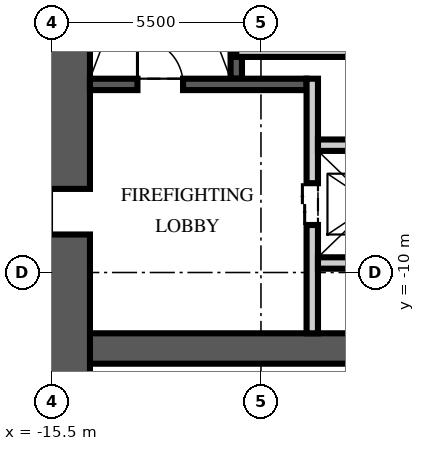
"""IFC4 building model, lengths in metres.
Left out: names, types, materials, properties, quantities, classifications, styles, units other than length and angle.
Written with IfcOpenShell. Run it as: python <this file> out.ifc"""

import sys

from ifc_helpers import new_model, si_unit, direction, frame, frame_2d, origin, place, context, subcontext, project, spatial, rectangle, extrude, element, fill, save


model = new_model("IFC4")
c1 = context("Model", 3, precision=1e-05, world=origin(), true_north=direction((0.0, 1.0)))
c2 = subcontext(c1, "Body", "Model", "MODEL_VIEW")
j1 = project(units=[si_unit("LENGTHUNIT", "METRE"), si_unit("PLANEANGLEUNIT", "RADIAN")], contexts=[c1])
p1 = place(None, origin())
s1 = spatial("IfcSite", under=j1, at=p1, CompositionType="ELEMENT")
p2 = place(p1, origin())
s2 = spatial("IfcBuilding", under=s1, at=p2, CompositionType="ELEMENT")
p3 = place(p2, frame((0.0, 0.0, 77.25)))
s3 = spatial("IfcBuildingStorey", under=s2, at=p3, CompositionType="ELEMENT", Elevation=77.25)
p4 = place(p3, frame((-15.5, -12.0, -0.25), z_axis=(0.0, 0.0, 1.0), x_axis=(1.0, 0.0, 0.0)))
e1 = element("IfcWall", 1, at=p4, inside=s3, PredefinedType="SHEAR", context=c2, shape_type="SweptSolid", body=[
    extrude(rectangle(XDim=31.0, YDim=0.8, at=frame_2d((15.5, 0.0))), origin(), (0.0, 0.0, 1.0), 3.75),
])
p5 = place(p3, frame((-15.5, -15.5, -0.25), z_axis=(0.0, 0.0, 1.0), x_axis=(0.0, 1.0, 0.0)))
e2 = element("IfcWall", 2, at=p5, inside=s3, PredefinedType="SHEAR", context=c2, shape_type="SweptSolid", body=[
    extrude(rectangle(XDim=31.0, YDim=2.0, at=frame_2d((15.5, 0.0))), origin(), (0.0, 0.0, 1.0), 3.75),
])
p6 = place(p5, frame((6.5, 0.0, 0.25)))
e3 = element("IfcOpeningElement", 3, at=p6, cuts=e2, PredefinedType="OPENING", context=c2, shape_type="SweptSolid", body=[
    extrude(rectangle(XDim=1.2, YDim=2.1, at=frame_2d((0.6, 1.05))), frame((0.0, 1.01, 0.0), z_axis=(0.0, -1.0, 0.0), x_axis=(1.0, 0.0, 0.0)), (0.0, 0.0, 1.0), 2.02),
])
p7 = place(p5, frame((23.0, 0.0, 0.25)))
e4 = element("IfcOpeningElement", 4, at=p7, cuts=e2, PredefinedType="OPENING", context=c2, shape_type="SweptSolid", body=[
    extrude(rectangle(XDim=1.8, YDim=2.1, at=frame_2d((0.9, 1.05))), frame((0.0, 1.01, 0.0), z_axis=(0.0, -1.0, 0.0), x_axis=(1.0, 0.0, 0.0)), (0.0, 0.0, 1.0), 2.02),
])
p8 = place(p3, frame((-10.65, -4.9, 0.0), z_axis=(0.0, 0.0, 1.0), x_axis=(0.0, 1.0, 0.0)))
e5 = element("IfcWall", 5, at=p8, inside=s3, PredefinedType="SOLIDWALL", context=c2, shape_type="SweptSolid", body=[
    extrude(rectangle(XDim=10.1, YDim=0.3, at=frame_2d((5.05, 0.0))), origin(), (0.0, 0.0, 1.0), 3.5),
])
p9 = place(p3, frame((-14.5, -5.05, 0.0), z_axis=(0.0, 0.0, 1.0), x_axis=(1.0, 0.0, 0.0)))
e6 = element("IfcWall", 6, at=p9, inside=s3, PredefinedType="SOLIDWALL", context=c2, shape_type="SweptSolid", body=[
    extrude(rectangle(XDim=5.7, YDim=0.3, at=frame_2d((2.85, 0.0))), origin(), (0.0, 0.0, 1.0), 3.5),
])
p10 = place(p9, frame((1.25, 0.0, 0.0)))
e7 = element("IfcOpeningElement", 7, at=p10, cuts=e6, PredefinedType="OPENING", context=c2, shape_type="SweptSolid", body=[
    extrude(rectangle(XDim=1.2, YDim=2.1, at=frame_2d((0.6, 1.05))), frame((0.0, 0.16, 0.0), z_axis=(0.0, -1.0, 0.0), x_axis=(1.0, 0.0, 0.0)), (0.0, 0.0, 1.0), 0.32),
])
p11 = place(p3, frame((-8.65, -11.6, 0.0), z_axis=(0.0, 0.0, 1.0), x_axis=(0.0, 1.0, 0.0)))
e8 = element("IfcWall", 8, at=p11, inside=s3, PredefinedType="PARTITIONING", context=c2, shape_type="SweptSolid", body=[
    extrude(rectangle(XDim=6.7, YDim=0.3, at=frame_2d((3.35, 0.0))), origin(), (0.0, 0.0, 1.0), 3.5),
])
p12 = place(p11, frame((2.85, 0.0, 0.0)))
e9 = element("IfcOpeningElement", 9, at=p12, cuts=e8, PredefinedType="OPENING", context=c2, shape_type="SweptSolid", body=[
    extrude(rectangle(XDim=1.1, YDim=2.1, at=frame_2d((0.55, 1.05))), frame((0.0, 0.16, 0.0), z_axis=(0.0, -1.0, 0.0), x_axis=(1.0, 0.0, 0.0)), (0.0, 0.0, 1.0), 0.32),
])
p13 = place(p3, frame((-8.5, -6.65, 0.0), z_axis=(0.0, 0.0, 1.0), x_axis=(1.0, 0.0, 0.0)))
e10 = element("IfcWall", 10, at=p13, inside=s3, PredefinedType="PARTITIONING", context=c2, shape_type="SweptSolid", body=[
    extrude(rectangle(XDim=17.0, YDim=0.3, at=frame_2d((8.5, 0.0))), origin(), (0.0, 0.0, 1.0), 3.5),
])
p14 = place(p13, frame((7.8, 0.0, 0.0)))
e11 = element("IfcOpeningElement", 11, at=p14, cuts=e10, PredefinedType="OPENING", context=c2, shape_type="SweptSolid", body=[
    extrude(rectangle(XDim=1.3, YDim=2.4, at=frame_2d((0.65, 1.2))), frame((0.0, 0.16, 0.0), z_axis=(0.0, -1.0, 0.0), x_axis=(1.0, 0.0, 0.0)), (0.0, 0.0, 1.0), 0.32),
])
p15 = place(p13, frame((5.65, 0.0, 0.0)))
e12 = element("IfcOpeningElement", 12, at=p15, cuts=e10, PredefinedType="OPENING", context=c2, shape_type="SweptSolid", body=[
    extrude(rectangle(XDim=0.9, YDim=2.1, at=frame_2d((0.45, 1.05))), frame((0.0, 0.16, 0.0), z_axis=(0.0, -1.0, 0.0), x_axis=(1.0, 0.0, 0.0)), (0.0, 0.0, 1.0), 0.32),
])
p16 = place(p13, frame((10.4, 0.0, 0.0)))
e13 = element("IfcOpeningElement", 13, at=p16, cuts=e10, PredefinedType="OPENING", context=c2, shape_type="SweptSolid", body=[
    extrude(rectangle(XDim=0.9, YDim=2.1, at=frame_2d((0.45, 1.05))), frame((0.0, 0.16, 0.0), z_axis=(0.0, -1.0, 0.0), x_axis=(1.0, 0.0, 0.0)), (0.0, 0.0, 1.0), 0.32),
])
p17 = place(p3, frame((-8.5, -9.75, 0.0), z_axis=(0.0, 0.0, 1.0), x_axis=(1.0, 0.0, 0.0)))
e14 = element("IfcWall", 14, at=p17, inside=s3, PredefinedType="PARTITIONING", context=c2, shape_type="SweptSolid", body=[
    extrude(rectangle(XDim=2.9, YDim=0.3, at=frame_2d((1.45, 0.0))), origin(), (0.0, 0.0, 1.0), 3.5),
])
p18 = place(p3, frame((-10.65, -4.177, 0.0), z_axis=(0.0, 0.0, 1.0), x_axis=(1.0, 0.0, 0.0)))
e15 = element("IfcWall", 15, at=p18, inside=s3, PredefinedType="PARTITIONING", context=c2, shape_type="SweptSolid", body=[
    extrude(rectangle(XDim=6.45, YDim=0.3, at=frame_2d((3.225, 0.0))), origin(), (0.0, 0.0, 1.0), 3.5),
])
p19 = place(p10, origin())
e16 = element("IfcDoor", 16, at=p19, inside=s3, OperationType="SINGLE_SWING_LEFT", PredefinedType="DOOR", context=c2, shape_type="SweptSolid", body=[
    extrude(rectangle(XDim=1.2, YDim=2.1, at=frame_2d((0.6, 1.05))), frame((0.0, 0.025, 0.0), z_axis=(0.0, -1.0, 0.0), x_axis=(1.0, 0.0, 0.0)), (0.0, 0.0, 1.0), 0.05),
])
fill(e7, e16)
p20 = place(p6, origin())
e17 = element("IfcDoor", 17, at=p20, inside=s3, OperationType="SINGLE_SWING_LEFT", PredefinedType="DOOR", context=c2, shape_type="SweptSolid", body=[
    extrude(rectangle(XDim=1.2, YDim=2.1, at=frame_2d((0.6, 1.05))), frame((0.0, 0.025, 0.0), z_axis=(0.0, -1.0, 0.0), x_axis=(1.0, 0.0, 0.0)), (0.0, 0.0, 1.0), 0.05),
])
fill(e3, e17)
p21 = place(p12, origin())
e18 = element("IfcDoor", 18, at=p21, inside=s3, OperationType="DOUBLE_DOOR_SLIDING", PredefinedType="DOOR", context=c2, shape_type="SweptSolid", body=[
    extrude(rectangle(XDim=1.1, YDim=2.1, at=frame_2d((0.55, 1.05))), frame((0.0, 0.025, 0.0), z_axis=(0.0, -1.0, 0.0), x_axis=(1.0, 0.0, 0.0)), (0.0, 0.0, 1.0), 0.05),
])
fill(e9, e18)
save(model, sys.argv[1])
